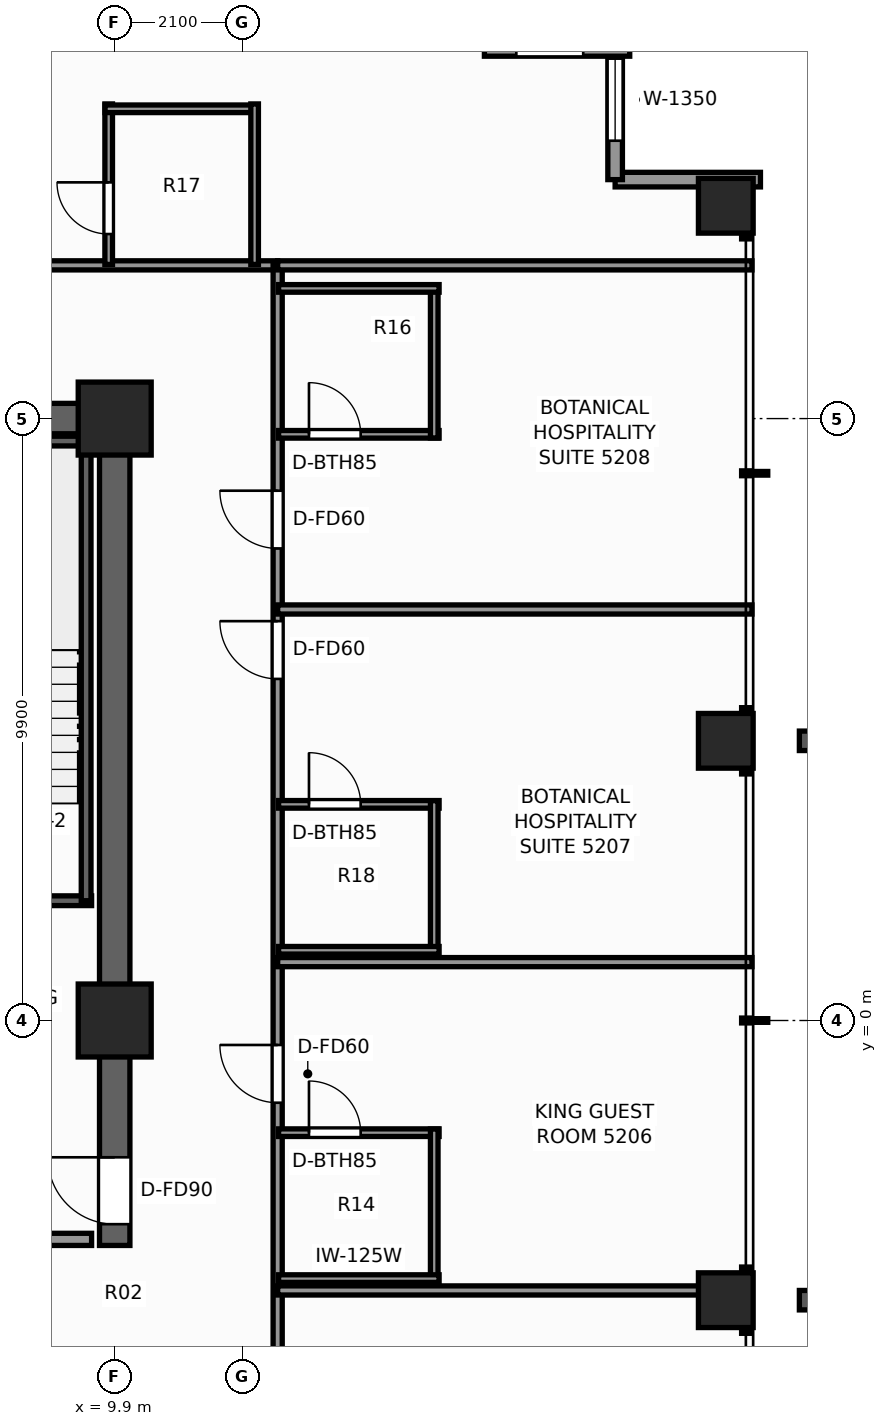
"""IFC4 building model, lengths in metres.
Left out: names, types, materials, properties, quantities, classifications, styles, units other than length and angle.
Written with IfcOpenShell. Run it as: python <this file> out.ifc"""

import sys

from ifc_helpers import new_model, si_unit, direction, frame, frame_2d, origin, origin_2d, place, context, subcontext, project, spatial, rectangle, extrude, element, fill, save


model = new_model("IFC4")
c1 = context("Model", 3, precision=1e-05, world=origin(), true_north=direction((0.0, 1.0)))
c2 = subcontext(c1, "Body", "Model", "MODEL_VIEW")
j1 = project(units=[si_unit("LENGTHUNIT", "METRE"), si_unit("PLANEANGLEUNIT", "RADIAN")], contexts=[c1])
p1 = place(None, origin())
s1 = spatial("IfcSite", under=j1, at=p1, CompositionType="ELEMENT")
p2 = place(p1, origin())
s2 = spatial("IfcBuilding", under=s1, at=p2, CompositionType="ELEMENT")
p3 = place(p2, frame((0.0, 0.0, 180.0)))
s3 = spatial("IfcBuildingStorey", under=s2, at=p3, CompositionType="ELEMENT", Elevation=180.0)
p4 = place(p3, frame((5.98, 9.9, 0.0), z_axis=(0.0, 0.0, 1.0), x_axis=(1.0, 0.0, 0.0)))
e1 = element("IfcWall", 1, at=p4, inside=s3, PredefinedType="SHEAR", context=c2, shape_type="SweptSolid", body=[
    extrude(rectangle(XDim=4.17, YDim=0.5, at=frame_2d((2.085, 0.0))), origin(), (0.0, 0.0, 1.0), 3.3),
])
p5 = place(p3, frame((9.9, -3.7, 0.0), z_axis=(0.0, 0.0, 1.0), x_axis=(0.0, 1.0, 0.0)))
e2 = element("IfcWall", 2, at=p5, inside=s3, PredefinedType="SHEAR", context=c2, shape_type="SweptSolid", body=[
    extrude(rectangle(XDim=13.35, YDim=0.5, at=frame_2d((6.675, 0.0))), origin(), (0.0, 0.0, 1.0), 3.3),
])
p6 = place(p5, frame((0.35, 0.0, 0.0)))
e3 = element("IfcOpeningElement", 3, at=p6, cuts=e2, PredefinedType="OPENING", context=c2, shape_type="SweptSolid", body=[
    extrude(rectangle(XDim=1.1, YDim=2.2, at=frame_2d((0.55, 1.1))), frame((0.0, 0.26, 0.0), z_axis=(0.0, -1.0, 0.0), x_axis=(1.0, 0.0, 0.0)), (0.0, 0.0, 1.0), 0.52),
])
for number, where, z_axis, x_axis in (
    (4, (9.9, 9.9, 0.0), (0.0, 0.0, 1.0), (1.0, 0.0, 0.0)),
    (5, (9.9, 0.0, 0.0), (0.0, 0.0, 1.0), (1.0, 0.0, 0.0)),
):
    element("IfcColumn", number, at=place(p3, frame(where, z_axis=z_axis, x_axis=x_axis)), inside=s3, PredefinedType="COLUMN", context=c2, shape_type="SweptSolid", body=[
        extrude(rectangle(XDim=1.2, YDim=1.2, at=origin_2d()), origin(), (0.0, 0.0, 1.0), 3.3),
    ])
for number, where, z_axis, x_axis in (
    (6, (19.95, -4.6, 0.0), (0.0, 0.0, 1.0), (1.0, 0.0, 0.0)),
    (7, (19.95, 4.6, 0.0), (0.0, 0.0, 1.0), (1.0, 0.0, 0.0)),
    (8, (19.95, 13.4, 0.0), (0.0, 0.0, 1.0), (1.0, 0.0, 0.0)),
):
    element("IfcColumn", number, at=place(p3, frame(where, z_axis=z_axis, x_axis=x_axis)), inside=s3, PredefinedType="COLUMN", context=c2, shape_type="SweptSolid", body=[
        extrude(rectangle(XDim=0.9, YDim=0.9, at=origin_2d()), origin(), (0.0, 0.0, 1.0), 3.3),
    ])
p7 = place(p3, frame((18.13, 13.83, 0.0), z_axis=(0.0, 0.0, 1.0), x_axis=(1.0, 0.0, 0.0)))
e9 = element("IfcWall", 9, at=p7, inside=s3, PredefinedType="STANDARD", context=c2, shape_type="SweptSolid", body=[
    extrude(rectangle(XDim=2.39, YDim=0.24, at=frame_2d((1.195, 0.0))), origin(), (0.0, 0.0, 1.0), 2.463),
])
p8 = place(p3, frame((18.13, 16.22, 0.0), z_axis=(0.0, 0.0, 1.0), x_axis=(0.0, -1.0, 0.0)))
e10 = element("IfcWall", 10, at=p8, inside=s3, PredefinedType="STANDARD", context=c2, shape_type="SweptSolid", body=[
    extrude(rectangle(XDim=2.39, YDim=0.24, at=frame_2d((1.195, 0.0))), origin(), (0.0, 0.0, 1.0), 2.463),
])
p9 = place(p8, frame((0.4, 0.0, 0.65)))
e11 = element("IfcOpeningElement", 11, at=p9, cuts=e10, PredefinedType="OPENING", context=c2, shape_type="SweptSolid", body=[
    extrude(rectangle(XDim=1.35, YDim=1.55, at=frame_2d((0.675, 0.775))), frame((0.0, 0.13, 0.0), z_axis=(0.0, -1.0, 0.0), x_axis=(1.0, 0.0, 0.0)), (0.0, 0.0, 1.0), 0.26),
])
p10 = place(p3, frame((15.98, 15.98, 0.0), z_axis=(0.0, 0.0, 1.0), x_axis=(1.0, 0.0, 0.0)))
e12 = element("IfcWall", 12, at=p10, inside=s3, PredefinedType="STANDARD", context=c2, shape_type="SweptSolid", body=[
    extrude(rectangle(XDim=2.39, YDim=0.24, at=frame_2d((1.195, 0.0))), origin(), (0.0, 0.0, 1.0), 2.463),
])
p11 = place(p10, frame((0.525, 0.0, 0.65)))
e13 = element("IfcOpeningElement", 13, at=p11, cuts=e12, PredefinedType="OPENING", context=c2, shape_type="SweptSolid", body=[
    extrude(rectangle(XDim=1.1, YDim=1.45, at=frame_2d((0.55, 0.725))), frame((0.0, 0.13, 0.0), z_axis=(0.0, -1.0, 0.0), x_axis=(1.0, 0.0, 0.0)), (0.0, 0.0, 1.0), 0.26),
])
p12 = place(p3, frame((6.0, 1.97, 0.0), z_axis=(0.0, 0.0, 1.0), x_axis=(1.0, 0.0, 0.0)))
e14 = element("IfcWall", 14, at=p12, inside=s3, PredefinedType="SHEAR", context=c2, shape_type="SweptSolid", body=[
    extrude(rectangle(XDim=3.52, YDim=0.16, at=frame_2d((1.76, 0.0))), origin(), (0.0, 0.0, 1.0), 3.3),
])
p13 = place(p12, frame((1.15, 0.0, 0.0)))
e15 = element("IfcOpeningElement", 15, at=p13, cuts=e14, PredefinedType="OPENING", context=c2, shape_type="SweptSolid", body=[
    extrude(rectangle(XDim=1.1, YDim=2.2, at=frame_2d((0.55, 1.1))), frame((0.0, 0.09, 0.0), z_axis=(0.0, -1.0, 0.0), x_axis=(1.0, 0.0, 0.0)), (0.0, 0.0, 1.0), 0.18),
])
p14 = place(p3, frame((6.0, 9.53, 0.0), z_axis=(0.0, 0.0, 1.0), x_axis=(1.0, 0.0, 0.0)))
e16 = element("IfcWall", 16, at=p14, inside=s3, PredefinedType="SHEAR", context=c2, shape_type="SweptSolid", body=[
    extrude(rectangle(XDim=3.52, YDim=0.16, at=frame_2d((1.76, 0.0))), origin(), (0.0, 0.0, 1.0), 3.3),
])
p15 = place(p3, frame((9.43, 1.97, 0.0), z_axis=(0.0, 0.0, 1.0), x_axis=(0.0, 1.0, 0.0)))
e17 = element("IfcWall", 17, at=p15, inside=s3, PredefinedType="SHEAR", context=c2, shape_type="SweptSolid", body=[
    extrude(rectangle(XDim=7.56, YDim=0.16, at=frame_2d((3.78, 0.0))), origin(), (0.0, 0.0, 1.0), 3.3),
])
p16 = place(p3, frame((5.75, -3.6, 0.0), z_axis=(0.0, 0.0, 1.0), x_axis=(1.0, 0.0, 0.0)))
e18 = element("IfcWall", 18, at=p16, inside=s3, PredefinedType="SOLIDWALL", context=c2, shape_type="SweptSolid", body=[
    extrude(rectangle(XDim=3.77, YDim=0.2, at=frame_2d((1.885, 0.0))), origin(), (0.0, 0.0, 1.0), 3.08),
])
p17 = place(p16, frame((1.15, 0.0, 0.0)))
e19 = element("IfcOpeningElement", 19, at=p17, cuts=e18, PredefinedType="OPENING", context=c2, shape_type="SweptSolid", body=[
    extrude(rectangle(XDim=0.95, YDim=2.06, at=frame_2d((0.475, 1.03))), frame((0.0, 0.11, 0.0), z_axis=(0.0, -1.0, 0.0), x_axis=(1.0, 0.0, 0.0)), (0.0, 0.0, 1.0), 0.22),
])
p18 = place(p3, frame((-12.26, 12.42, 0.0), z_axis=(0.0, 0.0, 1.0), x_axis=(1.0, 0.0, 0.0)))
e20 = element("IfcWall", 20, at=p18, inside=s3, PredefinedType="PARTITIONING", context=c2, shape_type="SweptSolid", body=[
    extrude(rectangle(XDim=24.84, YDim=0.15, at=frame_2d((12.42, 0.0))), origin(), (0.0, 0.0, 1.0), 2.369),
])
p19 = place(p18, frame((3.448, 0.0, 0.0)))
e21 = element("IfcOpeningElement", 21, at=p19, cuts=e20, PredefinedType="OPENING", context=c2, shape_type="SweptSolid", body=[
    extrude(rectangle(XDim=0.95, YDim=2.06, at=frame_2d((0.475, 1.03))), frame((0.0, 0.085, 0.0), z_axis=(0.0, -1.0, 0.0), x_axis=(1.0, 0.0, 0.0)), (0.0, 0.0, 1.0), 0.17),
])
p20 = place(p18, frame((5.312, 0.0, 0.0)))
e22 = element("IfcOpeningElement", 22, at=p20, cuts=e20, PredefinedType="OPENING", context=c2, shape_type="SweptSolid", body=[
    extrude(rectangle(XDim=0.95, YDim=2.06, at=frame_2d((0.475, 1.03))), frame((0.0, 0.085, 0.0), z_axis=(0.0, -1.0, 0.0), x_axis=(1.0, 0.0, 0.0)), (0.0, 0.0, 1.0), 0.17),
])
p21 = place(p18, frame((13.906, 0.0, 0.0)))
e23 = element("IfcOpeningElement", 23, at=p21, cuts=e20, PredefinedType="OPENING", context=c2, shape_type="SweptSolid", body=[
    extrude(rectangle(XDim=0.95, YDim=2.06, at=frame_2d((0.475, 1.03))), frame((0.0, 0.085, 0.0), z_axis=(0.0, -1.0, 0.0), x_axis=(1.0, 0.0, 0.0)), (0.0, 0.0, 1.0), 0.17),
])
p22 = place(p18, frame((19.666, 0.0, 0.0)))
e24 = element("IfcOpeningElement", 24, at=p22, cuts=e20, PredefinedType="OPENING", context=c2, shape_type="SweptSolid", body=[
    extrude(rectangle(XDim=0.95, YDim=2.06, at=frame_2d((0.475, 1.03))), frame((0.0, 0.085, 0.0), z_axis=(0.0, -1.0, 0.0), x_axis=(1.0, 0.0, 0.0)), (0.0, 0.0, 1.0), 0.17),
])
p23 = place(p3, frame((12.58, -12.42, 0.0), z_axis=(0.0, 0.0, 1.0), x_axis=(0.0, 1.0, 0.0)))
e25 = element("IfcWall", 25, at=p23, inside=s3, PredefinedType="PARTITIONING", context=c2, shape_type="SweptSolid", body=[
    extrude(rectangle(XDim=24.84, YDim=0.15, at=frame_2d((12.42, 0.0))), origin(), (0.0, 0.0, 1.0), 2.369),
])
p24 = place(p23, frame((3.024, 0.0, 0.0)))
e26 = element("IfcOpeningElement", 26, at=p24, cuts=e25, PredefinedType="OPENING", context=c2, shape_type="SweptSolid", body=[
    extrude(rectangle(XDim=0.9, YDim=2.06, at=frame_2d((0.45, 1.03))), frame((0.0, 0.085, 0.0), z_axis=(0.0, -1.0, 0.0), x_axis=(1.0, 0.0, 0.0)), (0.0, 0.0, 1.0), 0.17),
])
p25 = place(p23, frame((5.359, 0.0, 0.0)))
e27 = element("IfcOpeningElement", 27, at=p25, cuts=e25, PredefinedType="OPENING", context=c2, shape_type="SweptSolid", body=[
    extrude(rectangle(XDim=0.9, YDim=2.06, at=frame_2d((0.45, 1.03))), frame((0.0, 0.085, 0.0), z_axis=(0.0, -1.0, 0.0), x_axis=(1.0, 0.0, 0.0)), (0.0, 0.0, 1.0), 0.17),
])
p26 = place(p23, frame((11.067, 0.0, 0.0)))
e28 = element("IfcOpeningElement", 28, at=p26, cuts=e25, PredefinedType="OPENING", context=c2, shape_type="SweptSolid", body=[
    extrude(rectangle(XDim=0.95, YDim=2.06, at=frame_2d((0.475, 1.03))), frame((0.0, 0.085, 0.0), z_axis=(0.0, -1.0, 0.0), x_axis=(1.0, 0.0, 0.0)), (0.0, 0.0, 1.0), 0.17),
])
p27 = place(p23, frame((18.038, 0.0, 0.0)))
e29 = element("IfcOpeningElement", 29, at=p27, cuts=e25, PredefinedType="OPENING", context=c2, shape_type="SweptSolid", body=[
    extrude(rectangle(XDim=0.95, YDim=2.06, at=frame_2d((0.475, 1.03))), frame((0.0, 0.085, 0.0), z_axis=(0.0, -1.0, 0.0), x_axis=(1.0, 0.0, 0.0)), (0.0, 0.0, 1.0), 0.17),
])
p28 = place(p23, frame((20.184, 0.0, 0.0)))
e30 = element("IfcOpeningElement", 30, at=p28, cuts=e25, PredefinedType="OPENING", context=c2, shape_type="SweptSolid", body=[
    extrude(rectangle(XDim=0.95, YDim=2.06, at=frame_2d((0.475, 1.03))), frame((0.0, 0.085, 0.0), z_axis=(0.0, -1.0, 0.0), x_axis=(1.0, 0.0, 0.0)), (0.0, 0.0, 1.0), 0.17),
])
for number, where, z_axis, x_axis in (
    (31, (12.58, 12.42, 0.0), (0.0, 0.0, 1.0), (1.0, 0.0, 0.0)),
    (32, (12.58, -4.44, 0.0), (0.0, 0.0, 1.0), (1.0, 0.0, 0.0)),
):
    element("IfcWall", number, at=place(p3, frame(where, z_axis=z_axis, x_axis=x_axis)), inside=s3, PredefinedType="PARTITIONING", context=c2, shape_type="SweptSolid", body=[
        extrude(rectangle(XDim=7.8, YDim=0.15, at=frame_2d((3.9, 0.0))), origin(), (0.0, 0.0, 1.0), 2.369),
    ])
p29 = place(p3, frame((12.58, 0.96, 0.0), z_axis=(0.0, 0.0, 1.0), x_axis=(1.0, 0.0, 0.0)))
e33 = element("IfcWall", 33, at=p29, inside=s3, PredefinedType="PARTITIONING", context=c2, shape_type="SweptSolid", body=[
    extrude(rectangle(XDim=7.8, YDim=0.15, at=frame_2d((3.9, 0.0))), origin(), (0.0, 0.0, 1.0), 2.453),
])
p30 = place(p3, frame((12.595, -1.845, 0.0), z_axis=(0.0, 0.0, 1.0), x_axis=(1.0, 0.0, 0.0)))
e34 = element("IfcWall", 34, at=p30, inside=s3, PredefinedType="PARTITIONING", context=c2, shape_type="SweptSolid", body=[
    extrude(rectangle(XDim=2.64, YDim=0.125, at=frame_2d((1.32, 0.0))), origin(), (0.0, 0.0, 1.0), 3.08),
])
p31 = place(p30, frame((0.5, 0.0, 0.0)))
e35 = element("IfcOpeningElement", 35, at=p31, cuts=e34, PredefinedType="OPENING", context=c2, shape_type="SweptSolid", body=[
    extrude(rectangle(XDim=0.85, YDim=2.03, at=frame_2d((0.425, 1.015))), frame((0.0, 0.073, 0.0), z_axis=(0.0, -1.0, 0.0), x_axis=(1.0, 0.0, 0.0)), (0.0, 0.0, 1.0), 0.145),
])
p32 = place(p3, frame((15.155, -4.305, 0.0), z_axis=(0.0, 0.0, 1.0), x_axis=(0.0, 1.0, 0.0)))
e36 = element("IfcWall", 36, at=p32, inside=s3, PredefinedType="PARTITIONING", context=c2, shape_type="SweptSolid", body=[
    extrude(rectangle(XDim=2.52, YDim=0.125, at=frame_2d((1.26, 0.0))), origin(), (0.0, 0.0, 1.0), 2.369),
])
p33 = place(p3, frame((12.595, -4.245, 0.0), z_axis=(0.0, 0.0, 1.0), x_axis=(1.0, 0.0, 0.0)))
e37 = element("IfcWall", 37, at=p33, inside=s3, PredefinedType="PARTITIONING", context=c2, shape_type="SweptSolid", body=[
    extrude(rectangle(XDim=2.64, YDim=0.125, at=frame_2d((1.32, 0.0))), origin(), (0.0, 0.0, 1.0), 3.08),
])
p34 = place(p3, frame((12.58, 6.76, 0.0), z_axis=(0.0, 0.0, 1.0), x_axis=(1.0, 0.0, 0.0)))
e38 = element("IfcWall", 38, at=p34, inside=s3, PredefinedType="PARTITIONING", context=c2, shape_type="SweptSolid", body=[
    extrude(rectangle(XDim=7.8, YDim=0.15, at=frame_2d((3.9, 0.0))), origin(), (0.0, 0.0, 1.0), 2.453),
])
p35 = place(p3, frame((12.595, 3.555, 0.0), z_axis=(0.0, 0.0, 1.0), x_axis=(1.0, 0.0, 0.0)))
e39 = element("IfcWall", 39, at=p35, inside=s3, PredefinedType="PARTITIONING", context=c2, shape_type="SweptSolid", body=[
    extrude(rectangle(XDim=2.64, YDim=0.125, at=frame_2d((1.32, 0.0))), origin(), (0.0, 0.0, 1.0), 3.08),
])
p36 = place(p35, frame((0.5, 0.0, 0.0)))
e40 = element("IfcOpeningElement", 40, at=p36, cuts=e39, PredefinedType="OPENING", context=c2, shape_type="SweptSolid", body=[
    extrude(rectangle(XDim=0.85, YDim=2.03, at=frame_2d((0.425, 1.015))), frame((0.0, 0.073, 0.0), z_axis=(0.0, -1.0, 0.0), x_axis=(1.0, 0.0, 0.0)), (0.0, 0.0, 1.0), 0.145),
])
p37 = place(p3, frame((15.155, 1.095, 0.0), z_axis=(0.0, 0.0, 1.0), x_axis=(0.0, 1.0, 0.0)))
e41 = element("IfcWall", 41, at=p37, inside=s3, PredefinedType="PARTITIONING", context=c2, shape_type="SweptSolid", body=[
    extrude(rectangle(XDim=2.52, YDim=0.125, at=frame_2d((1.26, 0.0))), origin(), (0.0, 0.0, 1.0), 2.369),
])
p38 = place(p3, frame((12.595, 1.155, 0.0), z_axis=(0.0, 0.0, 1.0), x_axis=(1.0, 0.0, 0.0)))
e42 = element("IfcWall", 42, at=p38, inside=s3, PredefinedType="PARTITIONING", context=c2, shape_type="SweptSolid", body=[
    extrude(rectangle(XDim=2.64, YDim=0.125, at=frame_2d((1.32, 0.0))), origin(), (0.0, 0.0, 1.0), 3.08),
])
p39 = place(p3, frame((12.595, 9.641, 0.0), z_axis=(0.0, 0.0, 1.0), x_axis=(1.0, 0.0, 0.0)))
e43 = element("IfcWall", 43, at=p39, inside=s3, PredefinedType="PARTITIONING", context=c2, shape_type="SweptSolid", body=[
    extrude(rectangle(XDim=2.64, YDim=0.125, at=frame_2d((1.32, 0.0))), origin(), (0.0, 0.0, 1.0), 3.08),
])
p40 = place(p39, frame((0.5, 0.0, 0.0)))
e44 = element("IfcOpeningElement", 44, at=p40, cuts=e43, PredefinedType="OPENING", context=c2, shape_type="SweptSolid", body=[
    extrude(rectangle(XDim=0.85, YDim=2.03, at=frame_2d((0.425, 1.015))), frame((0.0, 0.073, 0.0), z_axis=(0.0, -1.0, 0.0), x_axis=(1.0, 0.0, 0.0)), (0.0, 0.0, 1.0), 0.145),
])
p41 = place(p3, frame((15.155, 9.581, 0.0), z_axis=(0.0, 0.0, 1.0), x_axis=(0.0, 1.0, 0.0)))
e45 = element("IfcWall", 45, at=p41, inside=s3, PredefinedType="PARTITIONING", context=c2, shape_type="SweptSolid", body=[
    extrude(rectangle(XDim=2.52, YDim=0.125, at=frame_2d((1.26, 0.0))), origin(), (0.0, 0.0, 1.0), 2.369),
])
p42 = place(p3, frame((12.595, 12.041, 0.0), z_axis=(0.0, 0.0, 1.0), x_axis=(1.0, 0.0, 0.0)))
e46 = element("IfcWall", 46, at=p42, inside=s3, PredefinedType="PARTITIONING", context=c2, shape_type="SweptSolid", body=[
    extrude(rectangle(XDim=2.64, YDim=0.125, at=frame_2d((1.32, 0.0))), origin(), (0.0, 0.0, 1.0), 3.08),
])
p43 = place(p3, frame((9.801, 12.435, 0.0), z_axis=(0.0, 0.0, 1.0), x_axis=(0.0, 1.0, 0.0)))
e47 = element("IfcWall", 47, at=p43, inside=s3, PredefinedType="PARTITIONING", context=c2, shape_type="SweptSolid", body=[
    extrude(rectangle(XDim=2.64, YDim=0.125, at=frame_2d((1.32, 0.0))), origin(), (0.0, 0.0, 1.0), 3.08),
])
p44 = place(p43, frame((0.5, 0.0, 0.0)))
e48 = element("IfcOpeningElement", 48, at=p44, cuts=e47, PredefinedType="OPENING", context=c2, shape_type="SweptSolid", body=[
    extrude(rectangle(XDim=0.85, YDim=2.03, at=frame_2d((0.425, 1.015))), frame((0.0, 0.073, 0.0), z_axis=(0.0, -1.0, 0.0), x_axis=(1.0, 0.0, 0.0)), (0.0, 0.0, 1.0), 0.145),
])
p45 = place(p3, frame((9.741, 14.995, 0.0), z_axis=(0.0, 0.0, 1.0), x_axis=(1.0, 0.0, 0.0)))
e49 = element("IfcWall", 49, at=p45, inside=s3, PredefinedType="PARTITIONING", context=c2, shape_type="SweptSolid", body=[
    extrude(rectangle(XDim=2.52, YDim=0.125, at=frame_2d((1.26, 0.0))), origin(), (0.0, 0.0, 1.0), 2.369),
])
p46 = place(p3, frame((12.201, 12.435, 0.0), z_axis=(0.0, 0.0, 1.0), x_axis=(0.0, 1.0, 0.0)))
e50 = element("IfcWall", 50, at=p46, inside=s3, PredefinedType="PARTITIONING", context=c2, shape_type="SweptSolid", body=[
    extrude(rectangle(XDim=2.64, YDim=0.125, at=frame_2d((1.32, 0.0))), origin(), (0.0, 0.0, 1.0), 3.08),
])
p47 = place(p9, origin())
e51 = element("IfcWindow", 51, at=p47, inside=s3, PartitioningType="SINGLE_PANEL", PredefinedType="WINDOW", context=c2, shape_type="SweptSolid", body=[
    extrude(rectangle(XDim=1.35, YDim=1.55, at=frame_2d((0.675, 0.775))), frame((0.0, 0.03, 0.0), z_axis=(0.0, -1.0, 0.0), x_axis=(1.0, 0.0, 0.0)), (0.0, 0.0, 1.0), 0.06),
])
fill(e11, e51)
p48 = place(p6, origin())
e52 = element("IfcDoor", 52, at=p48, inside=s3, OperationType="SINGLE_SWING_RIGHT", PredefinedType="DOOR", context=c2, shape_type="SweptSolid", body=[
    extrude(rectangle(XDim=1.1, YDim=2.2, at=frame_2d((0.55, 1.1))), frame((0.0, 0.025, 0.0), z_axis=(0.0, -1.0, 0.0), x_axis=(1.0, 0.0, 0.0)), (0.0, 0.0, 1.0), 0.05),
])
fill(e3, e52)
p49 = place(p31, origin())
e53 = element("IfcDoor", 53, at=p49, inside=s3, OperationType="SINGLE_SWING_LEFT", PredefinedType="DOOR", context=c2, shape_type="SweptSolid", body=[
    extrude(rectangle(XDim=0.85, YDim=2.03, at=frame_2d((0.425, 1.015))), frame((0.0, 0.025, 0.0), z_axis=(0.0, -1.0, 0.0), x_axis=(1.0, 0.0, 0.0)), (0.0, 0.0, 1.0), 0.05),
])
fill(e35, e53)
p50 = place(p26, origin())
e54 = element("IfcDoor", 54, at=p50, inside=s3, OperationType="SINGLE_SWING_RIGHT", PredefinedType="DOOR", context=c2, shape_type="SweptSolid", body=[
    extrude(rectangle(XDim=0.95, YDim=2.06, at=frame_2d((0.475, 1.03))), frame((0.0, 0.025, 0.0), z_axis=(0.0, -1.0, 0.0), x_axis=(1.0, 0.0, 0.0)), (0.0, 0.0, 1.0), 0.05),
])
fill(e28, e54)
p51 = place(p36, origin())
e55 = element("IfcDoor", 55, at=p51, inside=s3, OperationType="SINGLE_SWING_LEFT", PredefinedType="DOOR", context=c2, shape_type="SweptSolid", body=[
    extrude(rectangle(XDim=0.85, YDim=2.03, at=frame_2d((0.425, 1.015))), frame((0.0, 0.025, 0.0), z_axis=(0.0, -1.0, 0.0), x_axis=(1.0, 0.0, 0.0)), (0.0, 0.0, 1.0), 0.05),
])
fill(e40, e55)
p52 = place(p27, origin())
e56 = element("IfcDoor", 56, at=p52, inside=s3, OperationType="SINGLE_SWING_RIGHT", PredefinedType="DOOR", context=c2, shape_type="SweptSolid", body=[
    extrude(rectangle(XDim=0.95, YDim=2.06, at=frame_2d((0.475, 1.03))), frame((0.0, 0.025, 0.0), z_axis=(0.0, -1.0, 0.0), x_axis=(1.0, 0.0, 0.0)), (0.0, 0.0, 1.0), 0.05),
])
fill(e29, e56)
p53 = place(p40, origin())
e57 = element("IfcDoor", 57, at=p53, inside=s3, OperationType="SINGLE_SWING_LEFT", PredefinedType="DOOR", context=c2, shape_type="SweptSolid", body=[
    extrude(rectangle(XDim=0.85, YDim=2.03, at=frame_2d((0.425, 1.015))), frame((0.0, 0.025, 0.0), z_axis=(0.0, -1.0, 0.0), x_axis=(1.0, 0.0, 0.0)), (0.0, 0.0, 1.0), 0.05),
])
fill(e44, e57)
p54 = place(p28, origin())
e58 = element("IfcDoor", 58, at=p54, inside=s3, OperationType="SINGLE_SWING_RIGHT", PredefinedType="DOOR", context=c2, shape_type="SweptSolid", body=[
    extrude(rectangle(XDim=0.95, YDim=2.06, at=frame_2d((0.475, 1.03))), frame((0.0, 0.025, 0.0), z_axis=(0.0, -1.0, 0.0), x_axis=(1.0, 0.0, 0.0)), (0.0, 0.0, 1.0), 0.05),
])
fill(e30, e58)
p55 = place(p44, origin())
e59 = element("IfcDoor", 59, at=p55, inside=s3, OperationType="SINGLE_SWING_RIGHT", PredefinedType="DOOR", context=c2, shape_type="SweptSolid", body=[
    extrude(rectangle(XDim=0.85, YDim=2.03, at=frame_2d((0.425, 1.015))), frame((0.0, 0.025, 0.0), z_axis=(0.0, -1.0, 0.0), x_axis=(1.0, 0.0, 0.0)), (0.0, 0.0, 1.0), 0.05),
])
fill(e48, e59)
save(model, sys.argv[1])
